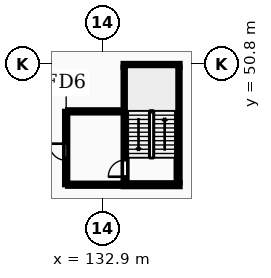
"""IFC4 building model, lengths in metres.
Left out: names, types, materials, properties, quantities, classifications, styles, units other than length and angle.
Written with IfcOpenShell. Run it as: python <this file> out.ifc"""

import sys

from ifc_helpers import new_model, si_unit, direction, frame, frame_2d, origin, place, context, subcontext, project, spatial, rectangle, extrude, element, fill, save


model = new_model("IFC4")
c1 = context("Model", 3, precision=1e-05, world=origin(), true_north=direction((0.0, 1.0)))
c2 = subcontext(c1, "Body", "Model", "MODEL_VIEW")
j1 = project(units=[si_unit("LENGTHUNIT", "METRE"), si_unit("PLANEANGLEUNIT", "RADIAN")], contexts=[c1])
p1 = place(None, origin())
s1 = spatial("IfcSite", under=j1, at=p1, CompositionType="ELEMENT")
p2 = place(p1, origin())
s2 = spatial("IfcBuilding", under=s1, at=p2, CompositionType="ELEMENT")
p3 = place(p2, frame((0.0, 0.0, 14.5)))
s3 = spatial("IfcBuildingStorey", under=s2, at=p3, CompositionType="ELEMENT", Elevation=14.5)
p4 = place(p3, frame((134.375, 43.0, 0.0), z_axis=(0.0, 0.0, 1.0), x_axis=(0.0, 1.0, 0.0)))
e1 = element("IfcWall", 1, at=p4, inside=s3, PredefinedType="SHEAR", context=c2, shape_type="SweptSolid", body=[
    extrude(rectangle(XDim=7.6, YDim=0.25, at=frame_2d((3.8, 0.0))), origin(), (0.0, 0.0, 1.0), 4.5),
])
p5 = place(p4, frame((0.4, 0.0, 0.0)))
e2 = element("IfcOpeningElement", 2, at=p5, cuts=e1, PredefinedType="OPENING", context=c2, shape_type="SweptSolid", body=[
    extrude(rectangle(XDim=1.1, YDim=2.1, at=frame_2d((0.55, 1.05))), frame((0.0, 0.135, 0.0), z_axis=(0.0, -1.0, 0.0), x_axis=(1.0, 0.0, 0.0)), (0.0, 0.0, 1.0), 0.27),
])
p6 = place(p3, frame((137.865, 43.0, 0.0), z_axis=(0.0, 0.0, 1.0), x_axis=(0.0, 1.0, 0.0)))
e3 = element("IfcWall", 3, at=p6, inside=s3, PredefinedType="SHEAR", context=c2, shape_type="SweptSolid", body=[
    extrude(rectangle(XDim=7.6, YDim=0.25, at=frame_2d((3.8, 0.0))), origin(), (0.0, 0.0, 1.0), 4.5),
])
for number, where, z_axis, x_axis in (
    (4, (134.25, 42.875, 0.0), (0.0, 0.0, 1.0), (1.0, 0.0, 0.0)),
    (5, (134.25, 50.725, 0.0), (0.0, 0.0, 1.0), (1.0, 0.0, 0.0)),
):
    element("IfcWall", number, at=place(p3, frame(where, z_axis=z_axis, x_axis=x_axis)), inside=s3, PredefinedType="SHEAR", context=c2, shape_type="SweptSolid", body=[
        extrude(rectangle(XDim=3.74, YDim=0.25, at=frame_2d((1.87, 0.0))), origin(), (0.0, 0.0, 1.0), 4.5),
    ])
p7 = place(p3, frame((130.5, 42.875, 0.0), z_axis=(0.0, 0.0, 1.0), x_axis=(0.0, 1.0, 0.0)))
e6 = element("IfcWall", 6, at=p7, inside=s3, PredefinedType="PARTITIONING", context=c2, shape_type="SweptSolid", body=[
    extrude(rectangle(XDim=4.825, YDim=0.2, at=frame_2d((2.413, 0.0))), origin(), (0.0, 0.0, 1.0), 4.18),
])
p8 = place(p7, frame((1.6, 0.0, 0.0)))
e7 = element("IfcOpeningElement", 7, at=p8, cuts=e6, PredefinedType="OPENING", context=c2, shape_type="SweptSolid", body=[
    extrude(rectangle(XDim=1.1, YDim=2.15, at=frame_2d((0.55, 1.075))), frame((0.0, 0.11, 0.0), z_axis=(0.0, -1.0, 0.0), x_axis=(1.0, 0.0, 0.0)), (0.0, 0.0, 1.0), 0.22),
])
for number, where, z_axis, x_axis in (
    (8, (130.6, 42.875, 0.0), (0.0, 0.0, 1.0), (1.0, 0.0, 0.0)),
    (9, (130.6, 47.7, 0.0), (0.0, 0.0, 1.0), (1.0, 0.0, 0.0)),
):
    element("IfcWall", number, at=place(p3, frame(where, z_axis=z_axis, x_axis=x_axis)), inside=s3, PredefinedType="PARTITIONING", context=c2, shape_type="SweptSolid", body=[
        extrude(rectangle(XDim=3.65, YDim=0.2, at=frame_2d((1.825, 0.0))), origin(), (0.0, 0.0, 1.0), 4.18),
    ])
p9 = place(p5, origin())
e10 = element("IfcDoor", 10, at=p9, inside=s3, OperationType="SINGLE_SWING_LEFT", PredefinedType="DOOR", context=c2, shape_type="SweptSolid", body=[
    extrude(rectangle(XDim=1.1, YDim=2.1, at=frame_2d((0.55, 1.05))), frame((0.0, 0.025, 0.0), z_axis=(0.0, -1.0, 0.0), x_axis=(1.0, 0.0, 0.0)), (0.0, 0.0, 1.0), 0.05),
])
fill(e2, e10)
p10 = place(p8, origin())
e11 = element("IfcDoor", 11, at=p10, inside=s3, OperationType="SINGLE_SWING_RIGHT", PredefinedType="DOOR", context=c2, shape_type="SweptSolid", body=[
    extrude(rectangle(XDim=1.1, YDim=2.15, at=frame_2d((0.55, 1.075))), frame((0.0, 0.025, 0.0), z_axis=(0.0, -1.0, 0.0), x_axis=(1.0, 0.0, 0.0)), (0.0, 0.0, 1.0), 0.05),
])
fill(e7, e11)
save(model, sys.argv[1])
